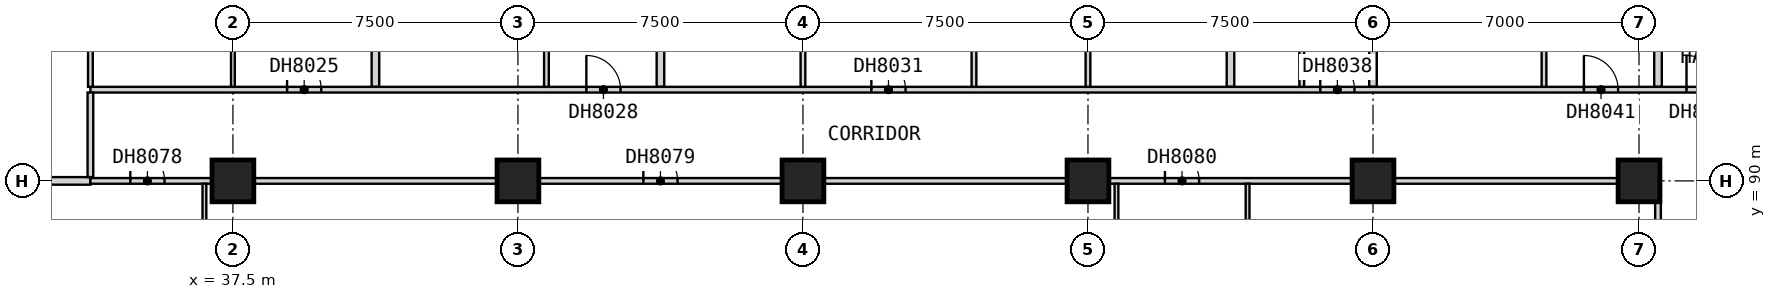
"""IFC4 building model, lengths in metres.
Left out: names, types, materials, properties, quantities, classifications, styles, units other than length and angle.
Written with IfcOpenShell. Run it as: python <this file> out.ifc"""

import sys

from ifc_helpers import new_model, si_unit, direction, frame, frame_2d, origin, origin_2d, place, context, subcontext, project, spatial, rectangle, extrude, element, fill, save


model = new_model("IFC4")
c1 = context("Model", 3, precision=1e-05, world=origin(), true_north=direction((0.0, 1.0)))
c2 = subcontext(c1, "Body", "Model", "MODEL_VIEW")
j1 = project(units=[si_unit("LENGTHUNIT", "METRE"), si_unit("PLANEANGLEUNIT", "RADIAN")], contexts=[c1])
p1 = place(None, origin())
s1 = spatial("IfcSite", under=j1, at=p1, CompositionType="ELEMENT")
p2 = place(p1, origin())
s2 = spatial("IfcBuilding", under=s1, at=p2, CompositionType="ELEMENT")
p3 = place(p2, frame((0.0, 0.0, 89.9)))
s3 = spatial("IfcBuildingStorey", under=s2, at=p3, CompositionType="ELEMENT", Elevation=89.9)
for number, where, z_axis, x_axis in (
    (1, (37.5, 90.0, 0.0), (0.0, 0.0, 1.0), (1.0, 0.0, 0.0)),
    (2, (45.0, 90.0, 0.0), (0.0, 0.0, 1.0), (1.0, 0.0, 0.0)),
    (3, (52.5, 90.0, 0.0), (0.0, 0.0, 1.0), (1.0, 0.0, 0.0)),
    (4, (60.0, 90.0, 0.0), (0.0, 0.0, 1.0), (1.0, 0.0, 0.0)),
    (5, (67.5, 90.0, 0.0), (0.0, 0.0, 1.0), (1.0, 0.0, 0.0)),
    (6, (74.5, 90.0, 0.0), (0.0, 0.0, 1.0), (1.0, 0.0, 0.0)),
):
    element("IfcColumn", number, at=place(p3, frame(where, z_axis=z_axis, x_axis=x_axis)), inside=s3, PredefinedType="COLUMN", context=c2, shape_type="SweptSolid", body=[
        extrude(rectangle(XDim=1.1, YDim=1.1, at=origin_2d()), origin(), (0.0, 0.0, 1.0), 3.6),
    ])
p4 = place(p3, frame((30.0, 90.0, 0.0), z_axis=(0.0, 0.0, 1.0), x_axis=(1.0, 0.0, 0.0)))
e7 = element("IfcWall", 7, at=p4, inside=s3, PredefinedType="PARTITIONING", context=c2, shape_type="SweptSolid", body=[
    extrude(rectangle(XDim=3.75, YDim=0.2, at=frame_2d((1.875, 0.0))), origin(), (0.0, 0.0, 1.0), 3.35),
])
for number, where, z_axis, x_axis in (
    (8, (41.25, 92.475, 0.0), (0.0, 0.0, 1.0), (0.0, 1.0, 0.0)),
    (9, (48.75, 92.475, 0.0), (0.0, 0.0, 1.0), (0.0, 1.0, 0.0)),
    (10, (63.75, 92.475, 0.0), (0.0, 0.0, 1.0), (0.0, 1.0, 0.0)),
):
    element("IfcWall", number, at=place(p3, frame(where, z_axis=z_axis, x_axis=x_axis)), inside=s3, PredefinedType="PARTITIONING", context=c2, shape_type="SweptSolid", body=[
        extrude(rectangle(XDim=11.715, YDim=0.2, at=frame_2d((5.857, 0.0))), origin(), (0.0, 0.0, 1.0), 3.35),
    ])
p5 = place(p3, frame((67.5, 92.475, 0.0), z_axis=(0.0, 0.0, 1.0), x_axis=(0.0, 1.0, 0.0)))
e11 = element("IfcWall", 11, at=p5, inside=s3, PredefinedType="PARTITIONING", context=c2, shape_type="SweptSolid", body=[
    extrude(rectangle(XDim=12.525, YDim=0.2, at=frame_2d((6.262, 0.0))), origin(), (0.0, 0.0, 1.0), 3.35),
])
p6 = place(p3, frame((75.0, 92.475, 0.0), z_axis=(0.0, 0.0, 1.0), x_axis=(0.0, 1.0, 0.0)))
e12 = element("IfcWall", 12, at=p6, inside=s3, PredefinedType="PARTITIONING", context=c2, shape_type="SweptSolid", body=[
    extrude(rectangle(XDim=11.715, YDim=0.2, at=frame_2d((5.857, 0.0))), origin(), (0.0, 0.0, 1.0), 3.35),
])
p7 = place(p3, frame((33.75, 90.0, 0.0), z_axis=(0.0, 0.0, 1.0), x_axis=(1.0, 0.0, 0.0)))
e13 = element("IfcWall", 13, at=p7, inside=s3, PredefinedType="PARTITIONING", context=c2, shape_type="SweptSolid", body=[
    extrude(rectangle(XDim=41.25, YDim=0.15, at=frame_2d((20.625, 0.0))), origin(), (0.0, 0.0, 1.0), 3.35),
])
p8 = place(p7, frame((1.05, 0.0, 0.0)))
e14 = element("IfcOpeningElement", 14, at=p8, cuts=e13, PredefinedType="OPENING", context=c2, shape_type="SweptSolid", body=[
    extrude(rectangle(XDim=0.9, YDim=2.1, at=frame_2d((0.45, 1.05))), frame((0.0, 0.085, 0.0), z_axis=(0.0, -1.0, 0.0), x_axis=(1.0, 0.0, 0.0)), (0.0, 0.0, 1.0), 0.17),
])
p9 = place(p7, frame((14.55, 0.0, 0.0)))
e15 = element("IfcOpeningElement", 15, at=p9, cuts=e13, PredefinedType="OPENING", context=c2, shape_type="SweptSolid", body=[
    extrude(rectangle(XDim=0.9, YDim=2.1, at=frame_2d((0.45, 1.05))), frame((0.0, 0.085, 0.0), z_axis=(0.0, -1.0, 0.0), x_axis=(1.0, 0.0, 0.0)), (0.0, 0.0, 1.0), 0.17),
])
p10 = place(p7, frame((28.275, 0.0, 0.0)))
e16 = element("IfcOpeningElement", 16, at=p10, cuts=e13, PredefinedType="OPENING", context=c2, shape_type="SweptSolid", body=[
    extrude(rectangle(XDim=0.9, YDim=2.1, at=frame_2d((0.45, 1.05))), frame((0.0, 0.085, 0.0), z_axis=(0.0, -1.0, 0.0), x_axis=(1.0, 0.0, 0.0)), (0.0, 0.0, 1.0), 0.17),
])
p11 = place(p3, frame((33.75, 92.4, 0.0), z_axis=(0.0, 0.0, 1.0), x_axis=(1.0, 0.0, 0.0)))
e17 = element("IfcWall", 17, at=p11, inside=s3, PredefinedType="PARTITIONING", context=c2, shape_type="SweptSolid", body=[
    extrude(rectangle(XDim=43.65, YDim=0.15, at=frame_2d((21.825, 0.0))), origin(), (0.0, 0.0, 1.0), 3.35),
])
p12 = place(p11, frame((5.175, 0.0, 0.0)))
e18 = element("IfcOpeningElement", 18, at=p12, cuts=e17, PredefinedType="OPENING", context=c2, shape_type="SweptSolid", body=[
    extrude(rectangle(XDim=0.9, YDim=2.1, at=frame_2d((0.45, 1.05))), frame((0.0, 0.085, 0.0), z_axis=(0.0, -1.0, 0.0), x_axis=(1.0, 0.0, 0.0)), (0.0, 0.0, 1.0), 0.17),
])
p13 = place(p11, frame((13.05, 0.0, 0.0)))
e19 = element("IfcOpeningElement", 19, at=p13, cuts=e17, PredefinedType="OPENING", context=c2, shape_type="SweptSolid", body=[
    extrude(rectangle(XDim=0.9, YDim=2.1, at=frame_2d((0.45, 1.05))), frame((0.0, 0.085, 0.0), z_axis=(0.0, -1.0, 0.0), x_axis=(1.0, 0.0, 0.0)), (0.0, 0.0, 1.0), 0.17),
])
p14 = place(p11, frame((20.55, 0.0, 0.0)))
e20 = element("IfcOpeningElement", 20, at=p14, cuts=e17, PredefinedType="OPENING", context=c2, shape_type="SweptSolid", body=[
    extrude(rectangle(XDim=0.9, YDim=2.1, at=frame_2d((0.45, 1.05))), frame((0.0, 0.085, 0.0), z_axis=(0.0, -1.0, 0.0), x_axis=(1.0, 0.0, 0.0)), (0.0, 0.0, 1.0), 0.17),
])
p15 = place(p11, frame((32.363, 0.0, 0.0)))
e21 = element("IfcOpeningElement", 21, at=p15, cuts=e17, PredefinedType="OPENING", context=c2, shape_type="SweptSolid", body=[
    extrude(rectangle(XDim=0.9, YDim=2.1, at=frame_2d((0.45, 1.05))), frame((0.0, 0.085, 0.0), z_axis=(0.0, -1.0, 0.0), x_axis=(1.0, 0.0, 0.0)), (0.0, 0.0, 1.0), 0.17),
])
p16 = place(p11, frame((39.3, 0.0, 0.0)))
e22 = element("IfcOpeningElement", 22, at=p16, cuts=e17, PredefinedType="OPENING", context=c2, shape_type="SweptSolid", body=[
    extrude(rectangle(XDim=0.9, YDim=2.1, at=frame_2d((0.45, 1.05))), frame((0.0, 0.085, 0.0), z_axis=(0.0, -1.0, 0.0), x_axis=(1.0, 0.0, 0.0)), (0.0, 0.0, 1.0), 0.17),
])
p17 = place(p11, frame((42.0, 0.0, 0.0)))
e23 = element("IfcOpeningElement", 23, at=p17, cuts=e17, PredefinedType="OPENING", context=c2, shape_type="SweptSolid", body=[
    extrude(rectangle(XDim=0.9, YDim=2.1, at=frame_2d((0.45, 1.05))), frame((0.0, 0.085, 0.0), z_axis=(0.0, -1.0, 0.0), x_axis=(1.0, 0.0, 0.0)), (0.0, 0.0, 1.0), 0.17),
])
p18 = place(p3, frame((33.75, 90.1, 0.0), z_axis=(0.0, 0.0, 1.0), x_axis=(0.0, 1.0, 0.0)))
e24 = element("IfcWall", 24, at=p18, inside=s3, PredefinedType="PARTITIONING", context=c2, shape_type="SweptSolid", body=[
    extrude(rectangle(XDim=2.225, YDim=0.15, at=frame_2d((1.112, 0.0))), origin(), (0.0, 0.0, 1.0), 3.35),
])
p19 = place(p3, frame((75.0, 78.075, 0.0), z_axis=(0.0, 0.0, 1.0), x_axis=(0.0, 1.0, 0.0)))
e25 = element("IfcWall", 25, at=p19, inside=s3, PredefinedType="PARTITIONING", context=c2, shape_type="SweptSolid", body=[
    extrude(rectangle(XDim=11.85, YDim=0.15, at=frame_2d((5.925, 0.0))), origin(), (0.0, 0.0, 1.0), 3.35),
])
p20 = place(p19, frame((7.725, 0.0, 0.0)))
e26 = element("IfcOpeningElement", 26, at=p20, cuts=e25, PredefinedType="OPENING", context=c2, shape_type="SweptSolid", body=[
    extrude(rectangle(XDim=0.9, YDim=2.1, at=frame_2d((0.45, 1.05))), frame((0.0, 0.085, 0.0), z_axis=(0.0, -1.0, 0.0), x_axis=(1.0, 0.0, 0.0)), (0.0, 0.0, 1.0), 0.17),
])
p21 = place(p19, frame((1.725, 0.0, 0.0)))
e27 = element("IfcOpeningElement", 27, at=p21, cuts=e25, PredefinedType="OPENING", context=c2, shape_type="SweptSolid", body=[
    extrude(rectangle(XDim=0.9, YDim=2.1, at=frame_2d((0.45, 1.05))), frame((0.0, 0.085, 0.0), z_axis=(0.0, -1.0, 0.0), x_axis=(1.0, 0.0, 0.0)), (0.0, 0.0, 1.0), 0.17),
])
p22 = place(p3, frame((36.75, 82.5, 0.0), z_axis=(0.0, 0.0, 1.0), x_axis=(0.0, 1.0, 0.0)))
e28 = element("IfcWall", 28, at=p22, inside=s3, PredefinedType="PARTITIONING", context=c2, shape_type="SweptSolid", body=[
    extrude(rectangle(XDim=7.425, YDim=0.1, at=frame_2d((3.712, 0.0))), origin(), (0.0, 0.0, 1.0), 3.35),
])
p23 = place(p3, frame((37.5, 92.475, 0.0), z_axis=(0.0, 0.0, 1.0), x_axis=(0.0, 1.0, 0.0)))
e29 = element("IfcWall", 29, at=p23, inside=s3, PredefinedType="PARTITIONING", context=c2, shape_type="SweptSolid", body=[
    extrude(rectangle(XDim=4.225, YDim=0.1, at=frame_2d((2.112, 0.0))), origin(), (0.0, 0.0, 1.0), 3.35),
])
p24 = place(p23, frame((1.65, 0.0, 0.0)))
e30 = element("IfcOpeningElement", 30, at=p24, cuts=e29, PredefinedType="OPENING", context=c2, shape_type="SweptSolid", body=[
    extrude(rectangle(XDim=0.9, YDim=2.1, at=frame_2d((0.45, 1.05))), frame((0.0, 0.06, 0.0), z_axis=(0.0, -1.0, 0.0), x_axis=(1.0, 0.0, 0.0)), (0.0, 0.0, 1.0), 0.12),
])
for number, where, z_axis, x_axis in (
    (31, (60.75, 82.55, 0.0), (0.0, 0.0, 1.0), (0.0, 1.0, 0.0)),
    (32, (64.2, 82.55, 0.0), (0.0, 0.0, 1.0), (0.0, 1.0, 0.0)),
):
    element("IfcWall", number, at=place(p3, frame(where, z_axis=z_axis, x_axis=x_axis)), inside=s3, PredefinedType="PARTITIONING", context=c2, shape_type="SweptSolid", body=[
        extrude(rectangle(XDim=7.375, YDim=0.1, at=frame_2d((3.688, 0.0))), origin(), (0.0, 0.0, 1.0), 3.35),
    ])
for number, where, z_axis, x_axis in (
    (33, (33.75, 92.475, 0.0), (0.0, 0.0, 1.0), (0.0, 1.0, 0.0)),
    (34, (45.75, 92.475, 0.0), (0.0, 0.0, 1.0), (0.0, 1.0, 0.0)),
    (35, (52.5, 92.475, 0.0), (0.0, 0.0, 1.0), (0.0, 1.0, 0.0)),
):
    element("IfcWall", number, at=place(p3, frame(where, z_axis=z_axis, x_axis=x_axis)), inside=s3, PredefinedType="PARTITIONING", context=c2, shape_type="SweptSolid", body=[
        extrude(rectangle(XDim=4.212, YDim=0.125, at=frame_2d((2.106, 0.0))), origin(), (0.0, 0.0, 1.0), 3.35),
    ])
p25 = place(p3, frame((57.0, 92.475, 0.0), z_axis=(0.0, 0.0, 1.0), x_axis=(0.0, 1.0, 0.0)))
e36 = element("IfcWall", 36, at=p25, inside=s3, PredefinedType="PARTITIONING", context=c2, shape_type="SweptSolid", body=[
    extrude(rectangle(XDim=4.212, YDim=0.125, at=frame_2d((2.106, 0.0))), origin(), (0.0, 0.0, 1.0), 3.35),
])
p26 = place(p25, frame((1.65, 0.0, 0.0)))
e37 = element("IfcOpeningElement", 37, at=p26, cuts=e36, PredefinedType="OPENING", context=c2, shape_type="SweptSolid", body=[
    extrude(rectangle(XDim=0.9, YDim=2.1, at=frame_2d((0.45, 1.05))), frame((0.0, 0.073, 0.0), z_axis=(0.0, -1.0, 0.0), x_axis=(1.0, 0.0, 0.0)), (0.0, 0.0, 1.0), 0.145),
])
for number, where, z_axis, x_axis in (
    (38, (60.0, 92.475, 0.0), (0.0, 0.0, 1.0), (0.0, 1.0, 0.0)),
    (39, (65.625, 92.475, 0.0), (0.0, 0.0, 1.0), (0.0, 1.0, 0.0)),
    (40, (72.0, 92.475, 0.0), (0.0, 0.0, 1.0), (0.0, 1.0, 0.0)),
):
    element("IfcWall", number, at=place(p3, frame(where, z_axis=z_axis, x_axis=x_axis)), inside=s3, PredefinedType="PARTITIONING", context=c2, shape_type="SweptSolid", body=[
        extrude(rectangle(XDim=4.212, YDim=0.125, at=frame_2d((2.106, 0.0))), origin(), (0.0, 0.0, 1.0), 3.35),
    ])
p27 = place(p12, origin())
e41 = element("IfcDoor", 41, at=p27, inside=s3, OperationType="SINGLE_SWING_LEFT", PredefinedType="DOOR", context=c2, shape_type="SweptSolid", body=[
    extrude(rectangle(XDim=0.9, YDim=2.1, at=frame_2d((0.45, 1.05))), frame((0.0, 0.025, 0.0), z_axis=(0.0, -1.0, 0.0), x_axis=(1.0, 0.0, 0.0)), (0.0, 0.0, 1.0), 0.05),
])
fill(e18, e41)
p28 = place(p13, origin())
e42 = element("IfcDoor", 42, at=p28, inside=s3, OperationType="SINGLE_SWING_LEFT", PredefinedType="DOOR", context=c2, shape_type="SweptSolid", body=[
    extrude(rectangle(XDim=0.9, YDim=2.1, at=frame_2d((0.45, 1.05))), frame((0.0, 0.025, 0.0), z_axis=(0.0, -1.0, 0.0), x_axis=(1.0, 0.0, 0.0)), (0.0, 0.0, 1.0), 0.05),
])
fill(e19, e42)
p29 = place(p14, origin())
e43 = element("IfcDoor", 43, at=p29, inside=s3, OperationType="SINGLE_SWING_LEFT", PredefinedType="DOOR", context=c2, shape_type="SweptSolid", body=[
    extrude(rectangle(XDim=0.9, YDim=2.1, at=frame_2d((0.45, 1.05))), frame((0.0, 0.025, 0.0), z_axis=(0.0, -1.0, 0.0), x_axis=(1.0, 0.0, 0.0)), (0.0, 0.0, 1.0), 0.05),
])
fill(e20, e43)
p30 = place(p15, origin())
e44 = element("IfcDoor", 44, at=p30, inside=s3, OperationType="SINGLE_SWING_LEFT", PredefinedType="DOOR", context=c2, shape_type="SweptSolid", body=[
    extrude(rectangle(XDim=0.9, YDim=2.1, at=frame_2d((0.45, 1.05))), frame((0.0, 0.025, 0.0), z_axis=(0.0, -1.0, 0.0), x_axis=(1.0, 0.0, 0.0)), (0.0, 0.0, 1.0), 0.05),
])
fill(e21, e44)
p31 = place(p16, origin())
e45 = element("IfcDoor", 45, at=p31, inside=s3, OperationType="SINGLE_SWING_LEFT", PredefinedType="DOOR", context=c2, shape_type="SweptSolid", body=[
    extrude(rectangle(XDim=0.9, YDim=2.1, at=frame_2d((0.45, 1.05))), frame((0.0, 0.025, 0.0), z_axis=(0.0, -1.0, 0.0), x_axis=(1.0, 0.0, 0.0)), (0.0, 0.0, 1.0), 0.05),
])
fill(e22, e45)
p32 = place(p17, origin())
e46 = element("IfcDoor", 46, at=p32, inside=s3, OperationType="SINGLE_SWING_RIGHT", PredefinedType="DOOR", context=c2, shape_type="SweptSolid", body=[
    extrude(rectangle(XDim=0.9, YDim=2.1, at=frame_2d((0.45, 1.05))), frame((0.0, 0.025, 0.0), z_axis=(0.0, -1.0, 0.0), x_axis=(1.0, 0.0, 0.0)), (0.0, 0.0, 1.0), 0.05),
])
fill(e23, e46)
p33 = place(p8, origin())
e47 = element("IfcDoor", 47, at=p33, inside=s3, OperationType="SINGLE_SWING_RIGHT", PredefinedType="DOOR", context=c2, shape_type="SweptSolid", body=[
    extrude(rectangle(XDim=0.9, YDim=2.1, at=frame_2d((0.45, 1.05))), frame((0.0, 0.025, 0.0), z_axis=(0.0, -1.0, 0.0), x_axis=(1.0, 0.0, 0.0)), (0.0, 0.0, 1.0), 0.05),
])
fill(e14, e47)
p34 = place(p9, origin())
e48 = element("IfcDoor", 48, at=p34, inside=s3, OperationType="SINGLE_SWING_RIGHT", PredefinedType="DOOR", context=c2, shape_type="SweptSolid", body=[
    extrude(rectangle(XDim=0.9, YDim=2.1, at=frame_2d((0.45, 1.05))), frame((0.0, 0.025, 0.0), z_axis=(0.0, -1.0, 0.0), x_axis=(1.0, 0.0, 0.0)), (0.0, 0.0, 1.0), 0.05),
])
fill(e15, e48)
p35 = place(p10, origin())
e49 = element("IfcDoor", 49, at=p35, inside=s3, OperationType="SINGLE_SWING_RIGHT", PredefinedType="DOOR", context=c2, shape_type="SweptSolid", body=[
    extrude(rectangle(XDim=0.9, YDim=2.1, at=frame_2d((0.45, 1.05))), frame((0.0, 0.025, 0.0), z_axis=(0.0, -1.0, 0.0), x_axis=(1.0, 0.0, 0.0)), (0.0, 0.0, 1.0), 0.05),
])
fill(e16, e49)
save(model, sys.argv[1])
